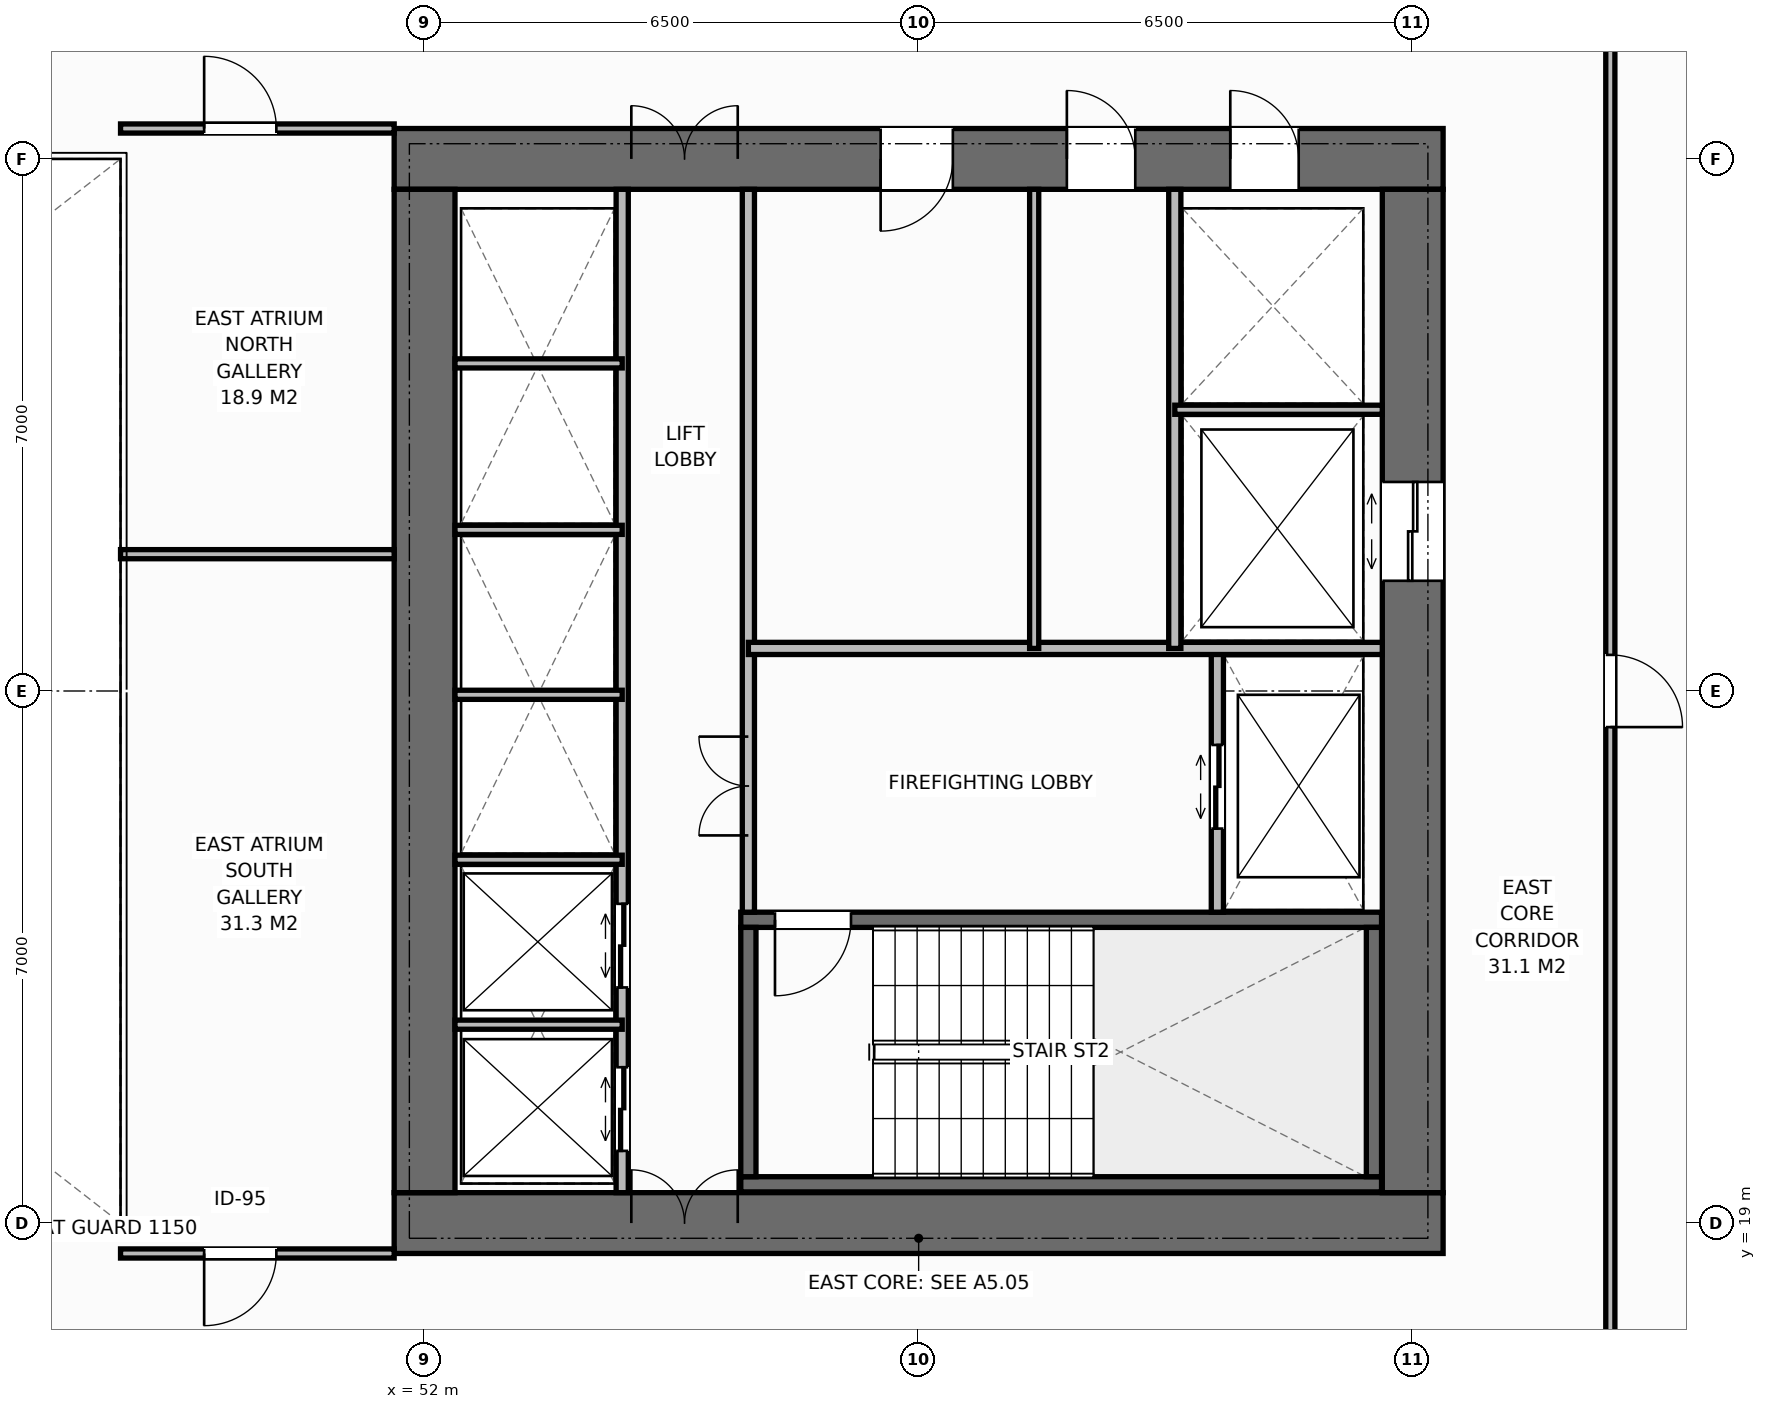
"""IFC4 building model, lengths in metres.
Left out: names, types, materials, properties, quantities, classifications, styles, units other than length and angle.
Written with IfcOpenShell. Run it as: python <this file> out.ifc"""

import sys

from ifc_helpers import new_model, si_unit, direction, frame, frame_2d, origin, place, context, subcontext, project, spatial, rectangle, extrude, element, fill, save


model = new_model("IFC4")
c1 = context("Model", 3, precision=1e-05, world=origin(), true_north=direction((0.0, 1.0)))
c2 = subcontext(c1, "Body", "Model", "MODEL_VIEW")
j1 = project(units=[si_unit("LENGTHUNIT", "METRE"), si_unit("PLANEANGLEUNIT", "RADIAN")], contexts=[c1])
p1 = place(None, origin())
s1 = spatial("IfcSite", under=j1, at=p1, CompositionType="ELEMENT")
p2 = place(p1, origin())
s2 = spatial("IfcBuilding", under=s1, at=p2, CompositionType="ELEMENT")
p3 = place(p2, frame((0.0, 0.0, 50.6)))
s3 = spatial("IfcBuildingStorey", under=s2, at=p3, CompositionType="ELEMENT", Elevation=50.6)
p4 = place(p3, frame((51.6, 19.0, 0.0), z_axis=(0.0, 0.0, 1.0), x_axis=(1.0, 0.0, 0.0)))
e1 = element("IfcWall", 1, at=p4, inside=s3, PredefinedType="SHEAR", context=c2, shape_type="SweptSolid", body=[
    extrude(rectangle(XDim=13.8, YDim=0.8, at=frame_2d((6.9, 0.0))), origin(), (0.0, 0.0, 1.0), 3.8),
])
p5 = place(p4, frame((3.12, 0.0, 0.0)))
e2 = element("IfcOpeningElement", 2, at=p5, cuts=e1, PredefinedType="OPENING", context=c2, shape_type="SweptSolid", body=[
    extrude(rectangle(XDim=1.4, YDim=2.2, at=frame_2d((0.7, 1.1))), frame((0.0, 0.41, 0.0), z_axis=(0.0, -1.0, 0.0), x_axis=(1.0, 0.0, 0.0)), (0.0, 0.0, 1.0), 0.82),
])
p6 = place(p3, frame((51.6, 33.0, 0.0), z_axis=(0.0, 0.0, 1.0), x_axis=(1.0, 0.0, 0.0)))
e3 = element("IfcWall", 3, at=p6, inside=s3, PredefinedType="SHEAR", context=c2, shape_type="SweptSolid", body=[
    extrude(rectangle(XDim=13.8, YDim=0.8, at=frame_2d((6.9, 0.0))), origin(), (0.0, 0.0, 1.0), 3.8),
])
p7 = place(p6, frame((3.12, 0.0, 0.0)))
e4 = element("IfcOpeningElement", 4, at=p7, cuts=e3, PredefinedType="OPENING", context=c2, shape_type="SweptSolid", body=[
    extrude(rectangle(XDim=1.4, YDim=2.2, at=frame_2d((0.7, 1.1))), frame((0.0, 0.41, 0.0), z_axis=(0.0, -1.0, 0.0), x_axis=(1.0, 0.0, 0.0)), (0.0, 0.0, 1.0), 0.82),
])
p8 = place(p6, frame((11.0, 0.0, 0.0)))
e5 = element("IfcOpeningElement", 5, at=p8, cuts=e3, PredefinedType="OPENING", context=c2, shape_type="SweptSolid", body=[
    extrude(rectangle(XDim=0.9, YDim=2.15, at=frame_2d((0.45, 1.075))), frame((0.0, 0.41, 0.0), z_axis=(0.0, -1.0, 0.0), x_axis=(1.0, 0.0, 0.0)), (0.0, 0.0, 1.0), 0.82),
])
p9 = place(p6, frame((6.4, 0.0, 0.0)))
e6 = element("IfcOpeningElement", 6, at=p9, cuts=e3, PredefinedType="OPENING", context=c2, shape_type="SweptSolid", body=[
    extrude(rectangle(XDim=0.95, YDim=2.15, at=frame_2d((0.475, 1.075))), frame((0.0, 0.41, 0.0), z_axis=(0.0, -1.0, 0.0), x_axis=(1.0, 0.0, 0.0)), (0.0, 0.0, 1.0), 0.82),
])
p10 = place(p6, frame((8.85, 0.0, 0.0)))
e7 = element("IfcOpeningElement", 7, at=p10, cuts=e3, PredefinedType="OPENING", context=c2, shape_type="SweptSolid", body=[
    extrude(rectangle(XDim=0.9, YDim=2.15, at=frame_2d((0.45, 1.075))), frame((0.0, 0.41, 0.0), z_axis=(0.0, -1.0, 0.0), x_axis=(1.0, 0.0, 0.0)), (0.0, 0.0, 1.0), 0.82),
])
p11 = place(p3, frame((52.0, 19.4, 0.0), z_axis=(0.0, 0.0, 1.0), x_axis=(0.0, 1.0, 0.0)))
e8 = element("IfcWall", 8, at=p11, inside=s3, PredefinedType="SHEAR", context=c2, shape_type="SweptSolid", body=[
    extrude(rectangle(XDim=13.2, YDim=0.8, at=frame_2d((6.6, 0.0))), origin(), (0.0, 0.0, 1.0), 3.8),
])
p12 = place(p3, frame((65.0, 19.4, 0.0), z_axis=(0.0, 0.0, 1.0), x_axis=(0.0, 1.0, 0.0)))
e9 = element("IfcWall", 9, at=p12, inside=s3, PredefinedType="SHEAR", context=c2, shape_type="SweptSolid", body=[
    extrude(rectangle(XDim=13.2, YDim=0.8, at=frame_2d((6.6, 0.0))), origin(), (0.0, 0.0, 1.0), 3.8),
])
p13 = place(p12, frame((8.05, 0.0, 0.0)))
e10 = element("IfcOpeningElement", 10, at=p13, cuts=e9, PredefinedType="OPENING", context=c2, shape_type="SweptSolid", body=[
    extrude(rectangle(XDim=1.3, YDim=2.2, at=frame_2d((0.65, 1.1))), frame((0.0, 0.41, 0.0), z_axis=(0.0, -1.0, 0.0), x_axis=(1.0, 0.0, 0.0)), (0.0, 0.0, 1.0), 0.82),
])
p14 = place(p3, frame((56.16, 19.51, 0.0), z_axis=(0.0, 0.0, 1.0), x_axis=(1.0, 0.0, 0.0)))
e11 = element("IfcWall", 11, at=p14, inside=s3, PredefinedType="SHEAR", context=c2, shape_type="SweptSolid", body=[
    extrude(rectangle(XDim=8.43, YDim=0.2, at=frame_2d((4.215, 0.0))), origin(), (0.0, 0.0, 1.0), 3.8),
])
p15 = place(p3, frame((56.16, 22.99, 0.0), z_axis=(0.0, 0.0, 1.0), x_axis=(1.0, 0.0, 0.0)))
e12 = element("IfcWall", 12, at=p15, inside=s3, PredefinedType="SHEAR", context=c2, shape_type="SweptSolid", body=[
    extrude(rectangle(XDim=8.43, YDim=0.2, at=frame_2d((4.215, 0.0))), origin(), (0.0, 0.0, 1.0), 3.8),
])
p16 = place(p15, frame((0.45, 0.0, 0.0)))
e13 = element("IfcOpeningElement", 13, at=p16, cuts=e12, PredefinedType="OPENING", context=c2, shape_type="SweptSolid", body=[
    extrude(rectangle(XDim=1.0, YDim=2.15, at=frame_2d((0.5, 1.075))), frame((0.0, 0.11, 0.0), z_axis=(0.0, -1.0, 0.0), x_axis=(1.0, 0.0, 0.0)), (0.0, 0.0, 1.0), 0.22),
])
for number, where, z_axis, x_axis in (
    (14, (56.26, 19.61, 0.0), (0.0, 0.0, 1.0), (0.0, 1.0, 0.0)),
    (15, (64.49, 19.61, 0.0), (0.0, 0.0, 1.0), (0.0, 1.0, 0.0)),
):
    element("IfcWall", number, at=place(p3, frame(where, z_axis=z_axis, x_axis=x_axis)), inside=s3, PredefinedType="SHEAR", context=c2, shape_type="SweptSolid", body=[
        extrude(rectangle(XDim=3.28, YDim=0.2, at=frame_2d((1.64, 0.0))), origin(), (0.0, 0.0, 1.0), 3.8),
    ])
p17 = place(p3, frame((54.6, 19.4, 0.0), z_axis=(0.0, 0.0, 1.0), x_axis=(0.0, 1.0, 0.0)))
e16 = element("IfcWall", 16, at=p17, inside=s3, PredefinedType="STANDARD", context=c2, shape_type="SweptSolid", body=[
    extrude(rectangle(XDim=13.2, YDim=0.16, at=frame_2d((6.6, 0.0))), origin(), (0.0, 0.0, 1.0), 3.55),
])
p18 = place(p17, frame((0.55, 0.0, 0.0)))
e17 = element("IfcOpeningElement", 17, at=p18, cuts=e16, PredefinedType="OPENING", context=c2, shape_type="SweptSolid", body=[
    extrude(rectangle(XDim=1.1, YDim=2.2, at=frame_2d((0.55, 1.1))), frame((0.0, 0.09, 0.0), z_axis=(0.0, -1.0, 0.0), x_axis=(1.0, 0.0, 0.0)), (0.0, 0.0, 1.0), 0.18),
])
p19 = place(p17, frame((2.7, 0.0, 0.0)))
e18 = element("IfcOpeningElement", 18, at=p19, cuts=e16, PredefinedType="OPENING", context=c2, shape_type="SweptSolid", body=[
    extrude(rectangle(XDim=1.1, YDim=2.2, at=frame_2d((0.55, 1.1))), frame((0.0, 0.09, 0.0), z_axis=(0.0, -1.0, 0.0), x_axis=(1.0, 0.0, 0.0)), (0.0, 0.0, 1.0), 0.18),
])
p20 = place(p3, frame((56.26, 23.09, 0.0), z_axis=(0.0, 0.0, 1.0), x_axis=(0.0, 1.0, 0.0)))
e19 = element("IfcWall", 19, at=p20, inside=s3, PredefinedType="STANDARD", context=c2, shape_type="SweptSolid", body=[
    extrude(rectangle(XDim=9.51, YDim=0.16, at=frame_2d((4.755, 0.0))), origin(), (0.0, 0.0, 1.0), 3.55),
])
p21 = place(p20, frame((1.01, 0.0, 0.0)))
e20 = element("IfcOpeningElement", 20, at=p21, cuts=e19, PredefinedType="OPENING", context=c2, shape_type="SweptSolid", body=[
    extrude(rectangle(XDim=1.3, YDim=2.2, at=frame_2d((0.65, 1.1))), frame((0.0, 0.09, 0.0), z_axis=(0.0, -1.0, 0.0), x_axis=(1.0, 0.0, 0.0)), (0.0, 0.0, 1.0), 0.18),
])
for number, where, z_axis, x_axis in (
    (21, (52.4, 21.61, 0.0), (0.0, 0.0, 1.0), (1.0, 0.0, 0.0)),
    (22, (52.4, 23.78, 0.0), (0.0, 0.0, 1.0), (1.0, 0.0, 0.0)),
    (23, (52.4, 25.95, 0.0), (0.0, 0.0, 1.0), (1.0, 0.0, 0.0)),
    (24, (52.4, 28.12, 0.0), (0.0, 0.0, 1.0), (1.0, 0.0, 0.0)),
    (25, (52.4, 30.31, 0.0), (0.0, 0.0, 1.0), (1.0, 0.0, 0.0)),
):
    element("IfcWall", number, at=place(p3, frame(where, z_axis=z_axis, x_axis=x_axis)), inside=s3, PredefinedType="PARTITIONING", context=c2, shape_type="SweptSolid", body=[
        extrude(rectangle(XDim=2.2, YDim=0.12, at=frame_2d((1.1, 0.0))), origin(), (0.0, 0.0, 1.0), 3.55),
    ])
p22 = place(p3, frame((62.43, 23.09, 0.0), z_axis=(0.0, 0.0, 1.0), x_axis=(0.0, 1.0, 0.0)))
e26 = element("IfcWall", 26, at=p22, inside=s3, PredefinedType="STANDARD", context=c2, shape_type="SweptSolid", body=[
    extrude(rectangle(XDim=3.47, YDim=0.16, at=frame_2d((1.735, 0.0))), origin(), (0.0, 0.0, 1.0), 3.55),
])
p23 = place(p22, frame((1.1, 0.0, 0.0)))
e27 = element("IfcOpeningElement", 27, at=p23, cuts=e26, PredefinedType="OPENING", context=c2, shape_type="SweptSolid", body=[
    extrude(rectangle(XDim=1.1, YDim=2.2, at=frame_2d((0.55, 1.1))), frame((0.0, 0.09, 0.0), z_axis=(0.0, -1.0, 0.0), x_axis=(1.0, 0.0, 0.0)), (0.0, 0.0, 1.0), 0.18),
])
p24 = place(p3, frame((56.26, 26.56, 0.0), z_axis=(0.0, 0.0, 1.0), x_axis=(1.0, 0.0, 0.0)))
e28 = element("IfcWall", 28, at=p24, inside=s3, PredefinedType="STANDARD", context=c2, shape_type="SweptSolid", body=[
    extrude(rectangle(XDim=8.34, YDim=0.16, at=frame_2d((4.17, 0.0))), origin(), (0.0, 0.0, 1.0), 3.55),
])
p25 = place(p3, frame((61.87, 26.56, 0.0), z_axis=(0.0, 0.0, 1.0), x_axis=(0.0, 1.0, 0.0)))
e29 = element("IfcWall", 29, at=p25, inside=s3, PredefinedType="STANDARD", context=c2, shape_type="SweptSolid", body=[
    extrude(rectangle(XDim=6.04, YDim=0.16, at=frame_2d((3.02, 0.0))), origin(), (0.0, 0.0, 1.0), 3.55),
])
p26 = place(p3, frame((61.87, 29.7, 0.0), z_axis=(0.0, 0.0, 1.0), x_axis=(1.0, 0.0, 0.0)))
e30 = element("IfcWall", 30, at=p26, inside=s3, PredefinedType="PARTITIONING", context=c2, shape_type="SweptSolid", body=[
    extrude(rectangle(XDim=2.73, YDim=0.12, at=frame_2d((1.365, 0.0))), origin(), (0.0, 0.0, 1.0), 3.55),
])
p27 = place(p3, frame((60.02, 26.56, 0.0), z_axis=(0.0, 0.0, 1.0), x_axis=(0.0, 1.0, 0.0)))
e31 = element("IfcWall", 31, at=p27, inside=s3, PredefinedType="PARTITIONING", context=c2, shape_type="SweptSolid", body=[
    extrude(rectangle(XDim=6.04, YDim=0.12, at=frame_2d((3.02, 0.0))), origin(), (0.0, 0.0, 1.0), 3.55),
])
p28 = place(p3, frame((48.0, 27.8, 0.0), z_axis=(0.0, 0.0, 1.0), x_axis=(1.0, 0.0, 0.0)))
e32 = element("IfcWall", 32, at=p28, inside=s3, PredefinedType="PARTITIONING", context=c2, shape_type="SweptSolid", body=[
    extrude(rectangle(XDim=3.6, YDim=0.12, at=frame_2d((1.8, 0.0))), origin(), (0.0, 0.0, 1.0), 3.55),
])
p29 = place(p3, frame((48.0, 18.6, 0.0), z_axis=(0.0, 0.0, 1.0), x_axis=(1.0, 0.0, 0.0)))
e33 = element("IfcWall", 33, at=p29, inside=s3, PredefinedType="PARTITIONING", context=c2, shape_type="SweptSolid", body=[
    extrude(rectangle(XDim=3.6, YDim=0.12, at=frame_2d((1.8, 0.0))), origin(), (0.0, 0.0, 1.0), 3.55),
])
p30 = place(p29, frame((1.1, 0.0, 0.0)))
e34 = element("IfcOpeningElement", 34, at=p30, cuts=e33, PredefinedType="OPENING", context=c2, shape_type="SweptSolid", body=[
    extrude(rectangle(XDim=0.95, YDim=2.15, at=frame_2d((0.475, 1.075))), frame((0.0, 0.07, 0.0), z_axis=(0.0, -1.0, 0.0), x_axis=(1.0, 0.0, 0.0)), (0.0, 0.0, 1.0), 0.14),
])
p31 = place(p3, frame((48.0, 33.4, 0.0), z_axis=(0.0, 0.0, 1.0), x_axis=(1.0, 0.0, 0.0)))
e35 = element("IfcWall", 35, at=p31, inside=s3, PredefinedType="PARTITIONING", context=c2, shape_type="SweptSolid", body=[
    extrude(rectangle(XDim=3.6, YDim=0.12, at=frame_2d((1.8, 0.0))), origin(), (0.0, 0.0, 1.0), 3.55),
])
p32 = place(p31, frame((1.1, 0.0, 0.0)))
e36 = element("IfcOpeningElement", 36, at=p32, cuts=e35, PredefinedType="OPENING", context=c2, shape_type="SweptSolid", body=[
    extrude(rectangle(XDim=0.95, YDim=2.15, at=frame_2d((0.475, 1.075))), frame((0.0, 0.07, 0.0), z_axis=(0.0, -1.0, 0.0), x_axis=(1.0, 0.0, 0.0)), (0.0, 0.0, 1.0), 0.14),
])
p33 = place(p3, frame((67.6, 16.5, 0.0), z_axis=(0.0, 0.0, 1.0), x_axis=(0.0, 1.0, 0.0)))
e37 = element("IfcWall", 37, at=p33, inside=s3, PredefinedType="PARTITIONING", context=c2, shape_type="SweptSolid", body=[
    extrude(rectangle(XDim=19.0, YDim=0.12, at=frame_2d((9.5, 0.0))), origin(), (0.0, 0.0, 1.0), 3.55),
])
p34 = place(p33, frame((9.025, 0.0, 0.0)))
e38 = element("IfcOpeningElement", 38, at=p34, cuts=e37, PredefinedType="OPENING", context=c2, shape_type="SweptSolid", body=[
    extrude(rectangle(XDim=0.95, YDim=2.15, at=frame_2d((0.475, 1.075))), frame((0.0, 0.07, 0.0), z_axis=(0.0, -1.0, 0.0), x_axis=(1.0, 0.0, 0.0)), (0.0, 0.0, 1.0), 0.14),
])
p35 = place(p5, origin())
e39 = element("IfcDoor", 39, at=p35, inside=s3, OperationType="DOUBLE_DOOR_SINGLE_SWING", PredefinedType="DOOR", context=c2, shape_type="SweptSolid", body=[
    extrude(rectangle(XDim=1.4, YDim=2.2, at=frame_2d((0.7, 1.1))), frame((0.0, 0.125, 0.0), z_axis=(0.0, -1.0, 0.0), x_axis=(1.0, 0.0, 0.0)), (0.0, 0.0, 1.0), 0.05),
])
fill(e2, e39)
p36 = place(p7, origin())
e40 = element("IfcDoor", 40, at=p36, inside=s3, OperationType="DOUBLE_DOOR_SINGLE_SWING", PredefinedType="DOOR", context=c2, shape_type="SweptSolid", body=[
    extrude(rectangle(XDim=1.4, YDim=2.2, at=frame_2d((0.7, 1.1))), frame((0.0, -0.075, 0.0), z_axis=(0.0, -1.0, 0.0), x_axis=(1.0, 0.0, 0.0)), (0.0, 0.0, 1.0), 0.05),
])
fill(e4, e40)
p37 = place(p18, origin())
e41 = element("IfcDoor", 41, at=p37, inside=s3, OperationType="DOUBLE_DOOR_SLIDING", PredefinedType="DOOR", context=c2, shape_type="SweptSolid", body=[
    extrude(rectangle(XDim=1.1, YDim=2.2, at=frame_2d((0.55, 1.1))), frame((0.0, 0.025, 0.0), z_axis=(0.0, -1.0, 0.0), x_axis=(1.0, 0.0, 0.0)), (0.0, 0.0, 1.0), 0.05),
])
fill(e17, e41)
p38 = place(p19, origin())
e42 = element("IfcDoor", 42, at=p38, inside=s3, OperationType="DOUBLE_DOOR_SLIDING", PredefinedType="DOOR", context=c2, shape_type="SweptSolid", body=[
    extrude(rectangle(XDim=1.1, YDim=2.2, at=frame_2d((0.55, 1.1))), frame((0.0, 0.025, 0.0), z_axis=(0.0, -1.0, 0.0), x_axis=(1.0, 0.0, 0.0)), (0.0, 0.0, 1.0), 0.05),
])
fill(e18, e42)
p39 = place(p16, origin())
e43 = element("IfcDoor", 43, at=p39, inside=s3, OperationType="SINGLE_SWING_RIGHT", PredefinedType="DOOR", context=c2, shape_type="SweptSolid", body=[
    extrude(rectangle(XDim=1.0, YDim=2.15, at=frame_2d((0.5, 1.075))), frame((0.0, 0.025, 0.0), z_axis=(0.0, -1.0, 0.0), x_axis=(1.0, 0.0, 0.0)), (0.0, 0.0, 1.0), 0.05),
])
fill(e13, e43)
p40 = place(p23, origin())
e44 = element("IfcDoor", 44, at=p40, inside=s3, OperationType="DOUBLE_DOOR_SLIDING", PredefinedType="DOOR", context=c2, shape_type="SweptSolid", body=[
    extrude(rectangle(XDim=1.1, YDim=2.2, at=frame_2d((0.55, 1.1))), frame((0.0, 0.025, 0.0), z_axis=(0.0, -1.0, 0.0), x_axis=(1.0, 0.0, 0.0)), (0.0, 0.0, 1.0), 0.05),
])
fill(e27, e44)
p41 = place(p21, origin())
e45 = element("IfcDoor", 45, at=p41, inside=s3, OperationType="DOUBLE_DOOR_SINGLE_SWING", PredefinedType="DOOR", context=c2, shape_type="SweptSolid", body=[
    extrude(rectangle(XDim=1.3, YDim=2.2, at=frame_2d((0.65, 1.1))), frame((0.0, 0.025, 0.0), z_axis=(0.0, -1.0, 0.0), x_axis=(1.0, 0.0, 0.0)), (0.0, 0.0, 1.0), 0.05),
])
fill(e20, e45)
p42 = place(p13, origin())
e46 = element("IfcDoor", 46, at=p42, inside=s3, OperationType="DOUBLE_DOOR_SLIDING", PredefinedType="DOOR", context=c2, shape_type="SweptSolid", body=[
    extrude(rectangle(XDim=1.3, YDim=2.2, at=frame_2d((0.65, 1.1))), frame((0.0, 0.025, 0.0), z_axis=(0.0, -1.0, 0.0), x_axis=(1.0, 0.0, 0.0)), (0.0, 0.0, 1.0), 0.05),
])
fill(e10, e46)
p43 = place(p8, origin())
e47 = element("IfcDoor", 47, at=p43, inside=s3, OperationType="SINGLE_SWING_LEFT", PredefinedType="DOOR", context=c2, shape_type="SweptSolid", body=[
    extrude(rectangle(XDim=0.9, YDim=2.15, at=frame_2d((0.45, 1.075))), frame((0.0, -0.075, 0.0), z_axis=(0.0, -1.0, 0.0), x_axis=(1.0, 0.0, 0.0)), (0.0, 0.0, 1.0), 0.05),
])
fill(e5, e47)
p44 = place(p9, origin())
e48 = element("IfcDoor", 48, at=p44, inside=s3, OperationType="SINGLE_SWING_RIGHT", PredefinedType="DOOR", context=c2, shape_type="SweptSolid", body=[
    extrude(rectangle(XDim=0.95, YDim=2.15, at=frame_2d((0.475, 1.075))), frame((0.0, -0.075, 0.0), z_axis=(0.0, -1.0, 0.0), x_axis=(1.0, 0.0, 0.0)), (0.0, 0.0, 1.0), 0.05),
])
fill(e6, e48)
p45 = place(p10, origin())
e49 = element("IfcDoor", 49, at=p45, inside=s3, OperationType="SINGLE_SWING_LEFT", PredefinedType="DOOR", context=c2, shape_type="SweptSolid", body=[
    extrude(rectangle(XDim=0.9, YDim=2.15, at=frame_2d((0.45, 1.075))), frame((0.0, -0.075, 0.0), z_axis=(0.0, -1.0, 0.0), x_axis=(1.0, 0.0, 0.0)), (0.0, 0.0, 1.0), 0.05),
])
fill(e7, e49)
p46 = place(p30, origin())
e50 = element("IfcDoor", 50, at=p46, inside=s3, OperationType="SINGLE_SWING_RIGHT", PredefinedType="DOOR", context=c2, shape_type="SweptSolid", body=[
    extrude(rectangle(XDim=0.95, YDim=2.15, at=frame_2d((0.475, 1.075))), frame((0.0, 0.025, 0.0), z_axis=(0.0, -1.0, 0.0), x_axis=(1.0, 0.0, 0.0)), (0.0, 0.0, 1.0), 0.05),
])
fill(e34, e50)
p47 = place(p32, origin())
e51 = element("IfcDoor", 51, at=p47, inside=s3, OperationType="SINGLE_SWING_LEFT", PredefinedType="DOOR", context=c2, shape_type="SweptSolid", body=[
    extrude(rectangle(XDim=0.95, YDim=2.15, at=frame_2d((0.475, 1.075))), frame((0.0, 0.025, 0.0), z_axis=(0.0, -1.0, 0.0), x_axis=(1.0, 0.0, 0.0)), (0.0, 0.0, 1.0), 0.05),
])
fill(e36, e51)
p48 = place(p34, origin())
e52 = element("IfcDoor", 52, at=p48, inside=s3, OperationType="SINGLE_SWING_RIGHT", PredefinedType="DOOR", context=c2, shape_type="SweptSolid", body=[
    extrude(rectangle(XDim=0.95, YDim=2.15, at=frame_2d((0.475, 1.075))), frame((0.0, 0.025, 0.0), z_axis=(0.0, -1.0, 0.0), x_axis=(1.0, 0.0, 0.0)), (0.0, 0.0, 1.0), 0.05),
])
fill(e38, e52)
save(model, sys.argv[1])
